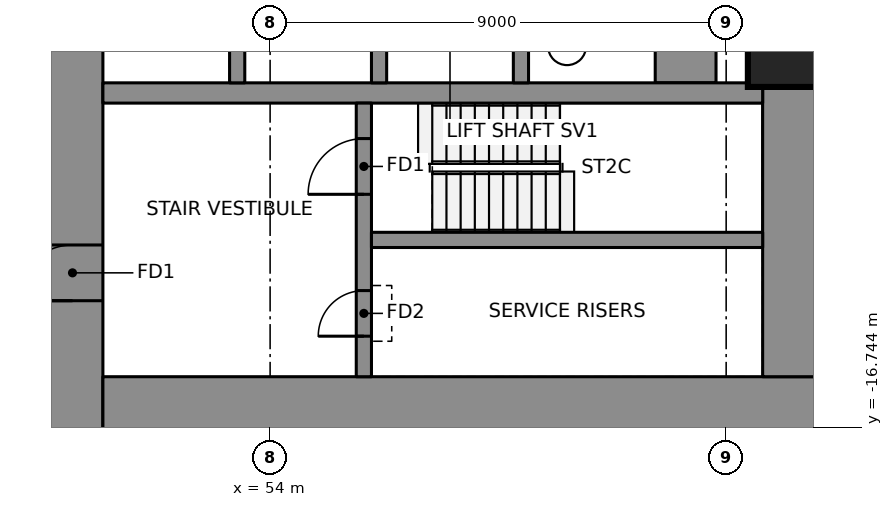
"""IFC4 building model, lengths in metres.
Left out: names, types, materials, properties, quantities, classifications, styles, units other than length and angle.
Written with IfcOpenShell. Run it as: python <this file> out.ifc"""

import sys

from ifc_helpers import new_model, si_unit, direction, frame, frame_2d, origin, origin_2d, place, context, subcontext, project, spatial, rectangle, extrude, element, fill, save


model = new_model("IFC4")
c1 = context("Model", 3, precision=1e-05, world=origin(), true_north=direction((0.0, 1.0)))
c2 = subcontext(c1, "Body", "Model", "MODEL_VIEW")
j1 = project(units=[si_unit("LENGTHUNIT", "METRE"), si_unit("PLANEANGLEUNIT", "RADIAN")], contexts=[c1])
p1 = place(None, origin())
s1 = spatial("IfcSite", under=j1, at=p1, CompositionType="ELEMENT")
p2 = place(p1, origin())
s2 = spatial("IfcBuilding", under=s1, at=p2, CompositionType="ELEMENT")
p3 = place(p2, frame((0.0, 0.0, 43.15)))
s3 = spatial("IfcBuildingStorey", under=s2, at=p3, CompositionType="ELEMENT", Elevation=43.15)
p4 = place(p3, frame((50.1, -16.95, 0.0), z_axis=(0.0, 0.0, 1.0), x_axis=(0.0, 1.0, 0.0)))
e1 = element("IfcWall", 1, at=p4, inside=s3, PredefinedType="SHEAR", context=c2, shape_type="SweptSolid", body=[
    extrude(rectangle(XDim=10.3, YDim=1.2, at=frame_2d((5.15, 0.0))), origin(), (0.0, 0.0, 1.0), 3.55),
])
p5 = place(p4, frame((2.7, 0.0, 0.0)))
e2 = element("IfcOpeningElement", 2, at=p5, cuts=e1, PredefinedType="OPENING", context=c2, shape_type="SweptSolid", body=[
    extrude(rectangle(XDim=1.1, YDim=2.1, at=frame_2d((0.55, 1.05))), frame((0.0, 0.61, 0.0), z_axis=(0.0, -1.0, 0.0), x_axis=(1.0, 0.0, 0.0)), (0.0, 0.0, 1.0), 1.22),
])
p6 = place(p3, frame((50.7, -16.35, 0.0), z_axis=(0.0, 0.0, 1.0), x_axis=(1.0, 0.0, 0.0)))
e3 = element("IfcWall", 3, at=p6, inside=s3, PredefinedType="SHEAR", context=c2, shape_type="SweptSolid", body=[
    extrude(rectangle(XDim=14.22, YDim=1.2, at=frame_2d((7.11, 0.0))), origin(), (0.0, 0.0, 1.0), 3.55),
])
p7 = place(p3, frame((64.32, -15.75, 0.0), z_axis=(0.0, 0.0, 1.0), x_axis=(0.0, 1.0, 0.0)))
e4 = element("IfcWall", 4, at=p7, inside=s3, PredefinedType="SHEAR", context=c2, shape_type="SweptSolid", body=[
    extrude(rectangle(XDim=5.8, YDim=1.2, at=frame_2d((2.9, 0.0))), origin(), (0.0, 0.0, 1.0), 3.55),
])
p8 = place(p3, frame((62.2, -9.95, 0.0), z_axis=(0.0, 0.0, 1.0), x_axis=(0.0, 1.0, 0.0)))
e5 = element("IfcWall", 5, at=p8, inside=s3, PredefinedType="SHEAR", context=c2, shape_type="SweptSolid", body=[
    extrude(rectangle(XDim=19.9, YDim=1.2, at=frame_2d((9.95, 0.0))), origin(), (0.0, 0.0, 1.0), 3.55),
])
p9 = place(p3, frame((50.7, -10.15, 0.0), z_axis=(0.0, 0.0, 1.0), x_axis=(1.0, 0.0, 0.0)))
e6 = element("IfcWall", 6, at=p9, inside=s3, PredefinedType="SHEAR", context=c2, shape_type="SweptSolid", body=[
    extrude(rectangle(XDim=13.02, YDim=0.4, at=frame_2d((6.51, 0.0))), origin(), (0.0, 0.0, 1.0), 3.55),
])
for number, where, z_axis, x_axis in (
    (7, (53.35, -9.95, 0.0), (0.0, 0.0, 1.0), (0.0, 1.0, 0.0)),
    (8, (56.15, -9.95, 0.0), (0.0, 0.0, 1.0), (0.0, 1.0, 0.0)),
    (9, (58.95, -9.95, 0.0), (0.0, 0.0, 1.0), (0.0, 1.0, 0.0)),
):
    element("IfcWall", number, at=place(p3, frame(where, z_axis=z_axis, x_axis=x_axis)), inside=s3, PredefinedType="SHEAR", context=c2, shape_type="SweptSolid", body=[
        extrude(rectangle(XDim=3.0, YDim=0.3, at=frame_2d((1.5, 0.0))), origin(), (0.0, 0.0, 1.0), 3.55),
    ])
p10 = place(p3, frame((55.85, -15.75, 0.0), z_axis=(0.0, 0.0, 1.0), x_axis=(0.0, 1.0, 0.0)))
e10 = element("IfcWall", 10, at=p10, inside=s3, PredefinedType="SHEAR", context=c2, shape_type="SweptSolid", body=[
    extrude(rectangle(XDim=5.4, YDim=0.3, at=frame_2d((2.7, 0.0))), origin(), (0.0, 0.0, 1.0), 3.55),
])
p11 = place(p10, frame((3.6, 0.0, 0.0)))
e11 = element("IfcOpeningElement", 11, at=p11, cuts=e10, PredefinedType="OPENING", context=c2, shape_type="SweptSolid", body=[
    extrude(rectangle(XDim=1.1, YDim=2.1, at=frame_2d((0.55, 1.05))), frame((0.0, 0.16, 0.0), z_axis=(0.0, -1.0, 0.0), x_axis=(1.0, 0.0, 0.0)), (0.0, 0.0, 1.0), 0.32),
])
p12 = place(p10, frame((0.8, 0.0, 0.0)))
e12 = element("IfcOpeningElement", 12, at=p12, cuts=e10, PredefinedType="OPENING", context=c2, shape_type="SweptSolid", body=[
    extrude(rectangle(XDim=0.9, YDim=2.1, at=frame_2d((0.45, 1.05))), frame((0.0, 0.16, 0.0), z_axis=(0.0, -1.0, 0.0), x_axis=(1.0, 0.0, 0.0)), (0.0, 0.0, 1.0), 0.32),
])
p13 = place(p3, frame((56.0, -13.05, 0.0), z_axis=(0.0, 0.0, 1.0), x_axis=(1.0, 0.0, 0.0)))
e13 = element("IfcWall", 13, at=p13, inside=s3, PredefinedType="SHEAR", context=c2, shape_type="SweptSolid", body=[
    extrude(rectangle(XDim=7.72, YDim=0.3, at=frame_2d((3.86, 0.0))), origin(), (0.0, 0.0, 1.0), 3.55),
])
p14 = place(p3, frame((64.328, -9.131, 0.0), z_axis=(0.0, 0.0, 1.0), x_axis=(1.0, 0.0, 0.0)))
e14 = element("IfcColumn", 14, at=p14, inside=s3, PredefinedType="COLUMN", context=c2, shape_type="SweptSolid", body=[
    extrude(rectangle(XDim=1.8, YDim=1.8, at=origin_2d()), origin(), (0.0, 0.0, 1.0), 3.55),
])
p15 = place(p11, origin())
e15 = element("IfcDoor", 15, at=p15, inside=s3, OperationType="SINGLE_SWING_RIGHT", PredefinedType="DOOR", context=c2, shape_type="SweptSolid", body=[
    extrude(rectangle(XDim=1.1, YDim=2.1, at=frame_2d((0.55, 1.05))), frame((0.0, 0.025, 0.0), z_axis=(0.0, -1.0, 0.0), x_axis=(1.0, 0.0, 0.0)), (0.0, 0.0, 1.0), 0.05),
])
fill(e11, e15)
p16 = place(p5, origin())
e16 = element("IfcDoor", 16, at=p16, inside=s3, OperationType="SINGLE_SWING_RIGHT", PredefinedType="DOOR", context=c2, shape_type="SweptSolid", body=[
    extrude(rectangle(XDim=1.1, YDim=2.1, at=frame_2d((0.55, 1.05))), frame((0.0, 0.025, 0.0), z_axis=(0.0, -1.0, 0.0), x_axis=(1.0, 0.0, 0.0)), (0.0, 0.0, 1.0), 0.05),
])
fill(e2, e16)
p17 = place(p12, origin())
e17 = element("IfcDoor", 17, at=p17, inside=s3, OperationType="SINGLE_SWING_LEFT", PredefinedType="DOOR", context=c2, shape_type="SweptSolid", body=[
    extrude(rectangle(XDim=0.9, YDim=2.1, at=frame_2d((0.45, 1.05))), frame((0.0, 0.025, 0.0), z_axis=(0.0, -1.0, 0.0), x_axis=(1.0, 0.0, 0.0)), (0.0, 0.0, 1.0), 0.05),
])
fill(e12, e17)
save(model, sys.argv[1])
